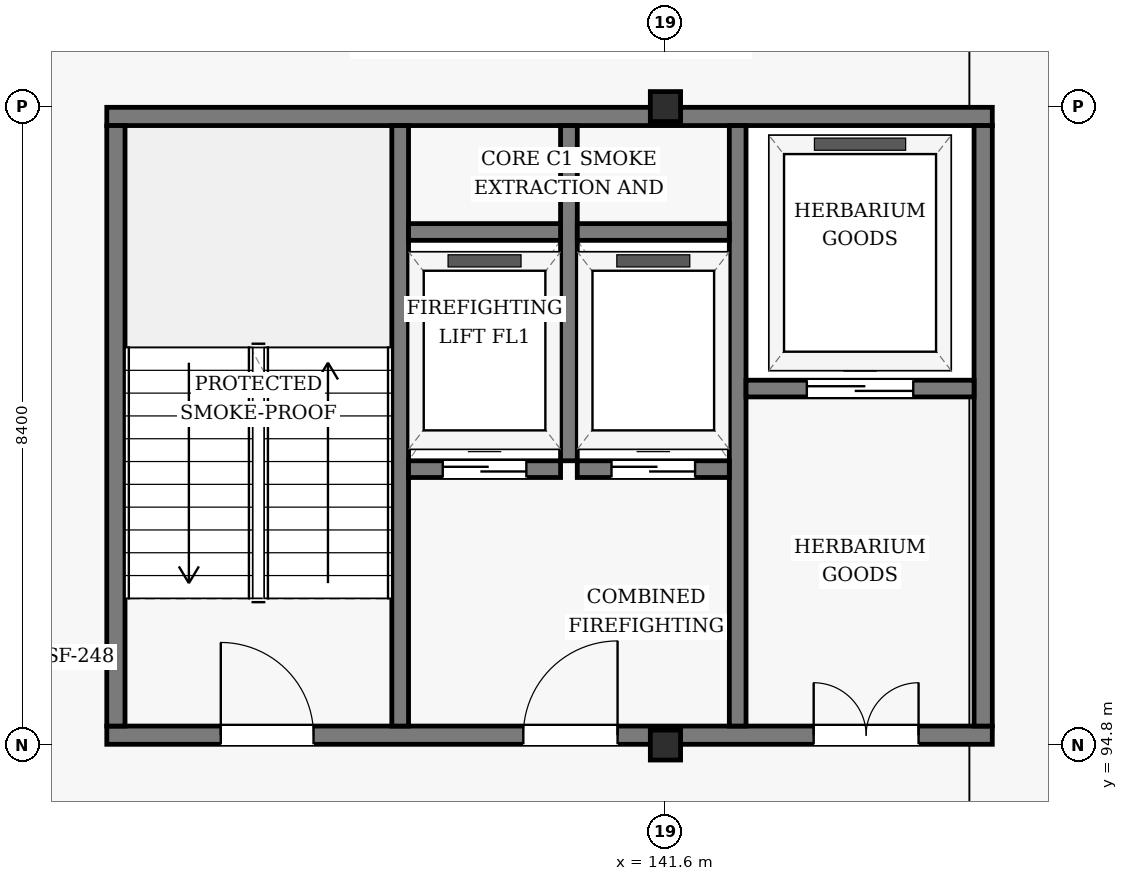
"""IFC4 building model, lengths in metres.
Left out: names, types, materials, properties, quantities, classifications, styles, units other than length and angle.
Written with IfcOpenShell. Run it as: python <this file> out.ifc"""

import sys

from ifc_helpers import new_model, si_unit, direction, frame, frame_2d, origin, origin_2d, place, context, subcontext, project, spatial, rectangle, i_section, extrude, element, fill, save


model = new_model("IFC4")
c1 = context("Model", 3, precision=1e-05, world=origin(), true_north=direction((0.0, 1.0)))
c2 = subcontext(c1, "Body", "Model", "MODEL_VIEW")
j1 = project(units=[si_unit("LENGTHUNIT", "METRE"), si_unit("PLANEANGLEUNIT", "RADIAN")], contexts=[c1])
p1 = place(None, origin())
s1 = spatial("IfcSite", under=j1, at=p1, CompositionType="ELEMENT")
p2 = place(p1, origin())
s2 = spatial("IfcBuilding", under=s1, at=p2, CompositionType="ELEMENT")
p3 = place(p2, frame((0.0, 0.0, 31.8)))
s3 = spatial("IfcBuildingStorey", under=s2, at=p3, CompositionType="ELEMENT", Elevation=31.8)
for number, where, z_axis, x_axis in (
    (1, (141.6, 94.8, 0.0), (0.0, 0.0, 1.0), (1.0, 0.0, 0.0)),
    (2, (141.6, 103.2, 0.0), (0.0, 0.0, 1.0), (1.0, 0.0, 0.0)),
):
    element("IfcColumn", number, at=place(p3, frame(where, z_axis=z_axis, x_axis=x_axis)), inside=s3, PredefinedType="COLUMN", context=c2, shape_type="SweptSolid", body=[
        extrude(i_section(OverallWidth=0.398, OverallDepth=0.394, WebThickness=0.011, FlangeThickness=0.018, FilletRadius=0.022, at=origin_2d()), origin(), (0.0, 0.0, 1.0), 3.6),
    ])
p4 = place(p3, frame((134.25, 94.93, 0.0), z_axis=(0.0, 0.0, 1.0), x_axis=(1.0, 0.0, 0.0)))
e3 = element("IfcWall", 3, at=p4, inside=s3, PredefinedType="SHEAR", context=c2, shape_type="SweptSolid", body=[
    extrude(rectangle(XDim=11.65, YDim=0.24, at=frame_2d((5.825, 0.0))), origin(), (0.0, 0.0, 1.0), 3.295),
])
p5 = place(p4, frame((1.5, 0.0, 0.0)))
e4 = element("IfcOpeningElement", 4, at=p5, cuts=e3, PredefinedType="OPENING", context=c2, shape_type="SweptSolid", body=[
    extrude(rectangle(XDim=1.22, YDim=2.18, at=frame_2d((0.61, 1.09))), frame((0.0, 0.13, 0.0), z_axis=(0.0, -1.0, 0.0), x_axis=(1.0, 0.0, 0.0)), (0.0, 0.0, 1.0), 0.26),
])
p6 = place(p4, frame((5.48, 0.0, 0.0)))
e5 = element("IfcOpeningElement", 5, at=p6, cuts=e3, PredefinedType="OPENING", context=c2, shape_type="SweptSolid", body=[
    extrude(rectangle(XDim=1.24, YDim=2.15, at=frame_2d((0.62, 1.075))), frame((0.0, 0.13, 0.0), z_axis=(0.0, -1.0, 0.0), x_axis=(1.0, 0.0, 0.0)), (0.0, 0.0, 1.0), 0.26),
])
p7 = place(p4, frame((9.3, 0.0, 0.0)))
e6 = element("IfcOpeningElement", 6, at=p7, cuts=e3, PredefinedType="OPENING", context=c2, shape_type="SweptSolid", body=[
    extrude(rectangle(XDim=1.38, YDim=2.15, at=frame_2d((0.69, 1.075))), frame((0.0, 0.13, 0.0), z_axis=(0.0, -1.0, 0.0), x_axis=(1.0, 0.0, 0.0)), (0.0, 0.0, 1.0), 0.26),
])
p8 = place(p3, frame((134.25, 103.07, 0.0), z_axis=(0.0, 0.0, 1.0), x_axis=(1.0, 0.0, 0.0)))
e7 = element("IfcWall", 7, at=p8, inside=s3, PredefinedType="SHEAR", context=c2, shape_type="SweptSolid", body=[
    extrude(rectangle(XDim=11.65, YDim=0.24, at=frame_2d((5.825, 0.0))), origin(), (0.0, 0.0, 1.0), 3.295),
])
p9 = place(p3, frame((134.37, 95.05, 0.0), z_axis=(0.0, 0.0, 1.0), x_axis=(0.0, 1.0, 0.0)))
e8 = element("IfcWall", 8, at=p9, inside=s3, PredefinedType="SHEAR", context=c2, shape_type="SweptSolid", body=[
    extrude(rectangle(XDim=7.9, YDim=0.24, at=frame_2d((3.95, 0.0))), origin(), (0.0, 0.0, 1.0), 3.295),
])
p10 = place(p3, frame((138.11, 95.05, 0.0), z_axis=(0.0, 0.0, 1.0), x_axis=(0.0, 1.0, 0.0)))
e9 = element("IfcWall", 9, at=p10, inside=s3, PredefinedType="SHEAR", context=c2, shape_type="SweptSolid", body=[
    extrude(rectangle(XDim=7.9, YDim=0.22, at=frame_2d((3.95, 0.0))), origin(), (0.0, 0.0, 1.0), 3.295),
])
p11 = place(p3, frame((140.33, 98.54, 0.0), z_axis=(0.0, 0.0, 1.0), x_axis=(0.0, 1.0, 0.0)))
e10 = element("IfcWall", 10, at=p11, inside=s3, PredefinedType="SHEAR", context=c2, shape_type="SweptSolid", body=[
    extrude(rectangle(XDim=4.41, YDim=0.22, at=frame_2d((2.205, 0.0))), origin(), (0.0, 0.0, 1.0), 3.295),
])
p12 = place(p3, frame((142.55, 95.05, 0.0), z_axis=(0.0, 0.0, 1.0), x_axis=(0.0, 1.0, 0.0)))
e11 = element("IfcWall", 11, at=p12, inside=s3, PredefinedType="SHEAR", context=c2, shape_type="SweptSolid", body=[
    extrude(rectangle(XDim=7.9, YDim=0.22, at=frame_2d((3.95, 0.0))), origin(), (0.0, 0.0, 1.0), 3.295),
])
p13 = place(p3, frame((145.78, 95.05, 0.0), z_axis=(0.0, 0.0, 1.0), x_axis=(0.0, 1.0, 0.0)))
e12 = element("IfcWall", 12, at=p13, inside=s3, PredefinedType="SHEAR", context=c2, shape_type="SweptSolid", body=[
    extrude(rectangle(XDim=7.9, YDim=0.24, at=frame_2d((3.95, 0.0))), origin(), (0.0, 0.0, 1.0), 3.295),
])
p14 = place(p3, frame((138.22, 98.43, 0.0), z_axis=(0.0, 0.0, 1.0), x_axis=(1.0, 0.0, 0.0)))
e13 = element("IfcWall", 13, at=p14, inside=s3, PredefinedType="SHEAR", context=c2, shape_type="SweptSolid", body=[
    extrude(rectangle(XDim=2.0, YDim=0.22, at=frame_2d((1.0, 0.0))), origin(), (0.0, 0.0, 1.0), 3.295),
])
p15 = place(p14, frame((0.45, 0.0, 0.0)))
e14 = element("IfcOpeningElement", 14, at=p15, cuts=e13, PredefinedType="OPENING", context=c2, shape_type="SweptSolid", body=[
    extrude(rectangle(XDim=1.1, YDim=2.15, at=frame_2d((0.55, 1.075))), frame((0.0, 0.12, 0.0), z_axis=(0.0, -1.0, 0.0), x_axis=(1.0, 0.0, 0.0)), (0.0, 0.0, 1.0), 0.24),
])
p16 = place(p3, frame((140.44, 98.43, 0.0), z_axis=(0.0, 0.0, 1.0), x_axis=(1.0, 0.0, 0.0)))
e15 = element("IfcWall", 15, at=p16, inside=s3, PredefinedType="SHEAR", context=c2, shape_type="SweptSolid", body=[
    extrude(rectangle(XDim=2.0, YDim=0.22, at=frame_2d((1.0, 0.0))), origin(), (0.0, 0.0, 1.0), 3.295),
])
p17 = place(p16, frame((0.45, 0.0, 0.0)))
e16 = element("IfcOpeningElement", 16, at=p17, cuts=e15, PredefinedType="OPENING", context=c2, shape_type="SweptSolid", body=[
    extrude(rectangle(XDim=1.1, YDim=2.15, at=frame_2d((0.55, 1.075))), frame((0.0, 0.12, 0.0), z_axis=(0.0, -1.0, 0.0), x_axis=(1.0, 0.0, 0.0)), (0.0, 0.0, 1.0), 0.24),
])
for number, where, z_axis, x_axis in (
    (17, (138.22, 101.55, 0.0), (0.0, 0.0, 1.0), (1.0, 0.0, 0.0)),
    (18, (140.44, 101.55, 0.0), (0.0, 0.0, 1.0), (1.0, 0.0, 0.0)),
):
    element("IfcWall", number, at=place(p3, frame(where, z_axis=z_axis, x_axis=x_axis)), inside=s3, PredefinedType="SHEAR", context=c2, shape_type="SweptSolid", body=[
        extrude(rectangle(XDim=2.0, YDim=0.22, at=frame_2d((1.0, 0.0))), origin(), (0.0, 0.0, 1.0), 3.295),
    ])
p18 = place(p3, frame((142.66, 99.49, 0.0), z_axis=(0.0, 0.0, 1.0), x_axis=(1.0, 0.0, 0.0)))
e19 = element("IfcWall", 19, at=p18, inside=s3, PredefinedType="SHEAR", context=c2, shape_type="SweptSolid", body=[
    extrude(rectangle(XDim=3.0, YDim=0.22, at=frame_2d((1.5, 0.0))), origin(), (0.0, 0.0, 1.0), 3.295),
])
p19 = place(p18, frame((0.8, 0.0, 0.0)))
e20 = element("IfcOpeningElement", 20, at=p19, cuts=e19, PredefinedType="OPENING", context=c2, shape_type="SweptSolid", body=[
    extrude(rectangle(XDim=1.4, YDim=2.2, at=frame_2d((0.7, 1.1))), frame((0.0, 0.12, 0.0), z_axis=(0.0, -1.0, 0.0), x_axis=(1.0, 0.0, 0.0)), (0.0, 0.0, 1.0), 0.24),
])
p20 = place(p5, origin())
e21 = element("IfcDoor", 21, at=p20, inside=s3, OperationType="SINGLE_SWING_LEFT", PredefinedType="DOOR", context=c2, shape_type="SweptSolid", body=[
    extrude(rectangle(XDim=1.22, YDim=2.18, at=frame_2d((0.61, 1.09))), frame((0.0, 0.025, 0.0), z_axis=(0.0, -1.0, 0.0), x_axis=(1.0, 0.0, 0.0)), (0.0, 0.0, 1.0), 0.05),
])
fill(e4, e21)
p21 = place(p6, frame((1.24, 0.0, 0.0), z_axis=(0.0, 0.0, 1.0), x_axis=(-1.0, 0.0, 0.0)))
e22 = element("IfcDoor", 22, at=p21, inside=s3, OperationType="SINGLE_SWING_RIGHT", PredefinedType="DOOR", context=c2, shape_type="SweptSolid", body=[
    extrude(rectangle(XDim=1.24, YDim=2.15, at=frame_2d((0.62, 1.075))), frame((0.0, 0.025, 0.0), z_axis=(0.0, -1.0, 0.0), x_axis=(1.0, 0.0, 0.0)), (0.0, 0.0, 1.0), 0.05),
])
fill(e5, e22)
p22 = place(p7, frame((1.38, 0.0, 0.0), z_axis=(0.0, 0.0, 1.0), x_axis=(-1.0, 0.0, 0.0)))
e23 = element("IfcDoor", 23, at=p22, inside=s3, OperationType="DOUBLE_DOOR_SINGLE_SWING", PredefinedType="DOOR", context=c2, shape_type="SweptSolid", body=[
    extrude(rectangle(XDim=1.38, YDim=2.15, at=frame_2d((0.69, 1.075))), frame((0.0, 0.025, 0.0), z_axis=(0.0, -1.0, 0.0), x_axis=(1.0, 0.0, 0.0)), (0.0, 0.0, 1.0), 0.05),
])
fill(e6, e23)
p23 = place(p15, origin())
e24 = element("IfcDoor", 24, at=p23, inside=s3, OperationType="SLIDING_TO_LEFT", PredefinedType="DOOR", context=c2, shape_type="SweptSolid", body=[
    extrude(rectangle(XDim=1.1, YDim=2.15, at=frame_2d((0.55, 1.075))), frame((0.0, 0.025, 0.0), z_axis=(0.0, -1.0, 0.0), x_axis=(1.0, 0.0, 0.0)), (0.0, 0.0, 1.0), 0.05),
])
fill(e14, e24)
p24 = place(p17, origin())
e25 = element("IfcDoor", 25, at=p24, inside=s3, OperationType="SLIDING_TO_LEFT", PredefinedType="DOOR", context=c2, shape_type="SweptSolid", body=[
    extrude(rectangle(XDim=1.1, YDim=2.15, at=frame_2d((0.55, 1.075))), frame((0.0, 0.025, 0.0), z_axis=(0.0, -1.0, 0.0), x_axis=(1.0, 0.0, 0.0)), (0.0, 0.0, 1.0), 0.05),
])
fill(e16, e25)
p25 = place(p19, origin())
e26 = element("IfcDoor", 26, at=p25, inside=s3, OperationType="SLIDING_TO_LEFT", PredefinedType="DOOR", context=c2, shape_type="SweptSolid", body=[
    extrude(rectangle(XDim=1.4, YDim=2.2, at=frame_2d((0.7, 1.1))), frame((0.0, 0.025, 0.0), z_axis=(0.0, -1.0, 0.0), x_axis=(1.0, 0.0, 0.0)), (0.0, 0.0, 1.0), 0.05),
])
fill(e20, e26)
save(model, sys.argv[1])
